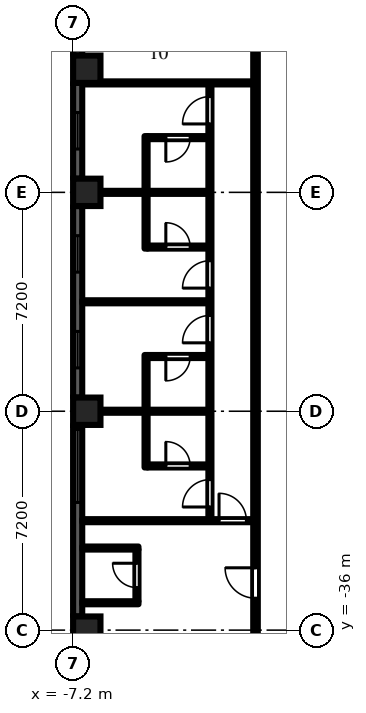
"""IFC4 building model, lengths in metres.
Left out: names, types, materials, properties, quantities, classifications, styles, units other than length and angle.
Written with IfcOpenShell. Run it as: python <this file> out.ifc"""

import sys

from ifc_helpers import new_model, si_unit, direction, frame, frame_2d, origin, origin_2d, place, context, subcontext, project, spatial, rectangle, extrude, element, fill, save


model = new_model("IFC4")
c1 = context("Model", 3, precision=1e-05, world=origin(), true_north=direction((0.0, 1.0)))
c2 = subcontext(c1, "Body", "Model", "MODEL_VIEW")
j1 = project(units=[si_unit("LENGTHUNIT", "METRE"), si_unit("PLANEANGLEUNIT", "RADIAN")], contexts=[c1])
p1 = place(None, origin())
s1 = spatial("IfcSite", under=j1, at=p1, CompositionType="ELEMENT")
p2 = place(p1, origin())
s2 = spatial("IfcBuilding", under=s1, at=p2, CompositionType="ELEMENT")
p3 = place(p2, frame((0.0, 0.0, 20.7)))
s3 = spatial("IfcBuildingStorey", under=s2, at=p3, CompositionType="ELEMENT", Elevation=20.7)
for number, where, z_axis, x_axis in (
    (1, (-6.75, -36.0, 0.0), (0.0, 0.0, 1.0), (1.0, 0.0, 0.0)),
    (2, (-6.75, -28.8, 0.0), (0.0, 0.0, 1.0), (1.0, 0.0, 0.0)),
    (3, (-6.75, -21.6, 0.0), (0.0, 0.0, 1.0), (1.0, 0.0, 0.0)),
    (4, (-6.75, -17.55, 0.0), (0.0, 0.0, 1.0), (1.0, 0.0, 0.0)),
):
    element("IfcColumn", number, at=place(p3, frame(where, z_axis=z_axis, x_axis=x_axis)), inside=s3, PredefinedType="COLUMN", context=c2, shape_type="SweptSolid", body=[
        extrude(rectangle(XDim=0.9, YDim=0.9, at=origin_2d()), origin(), (0.0, 0.0, 1.0), 3.0),
    ])
p4 = place(p3, frame((-7.05, -15.3, 0.0), z_axis=(0.0, 0.0, 1.0), x_axis=(0.0, -1.0, 0.0)))
e5 = element("IfcWall", 5, at=p4, inside=s3, PredefinedType="SOLIDWALL", context=c2, shape_type="SweptSolid", body=[
    extrude(rectangle(XDim=1.8, YDim=0.3, at=frame_2d((0.9, 0.0))), origin(), (0.0, 0.0, 1.0), 2.1),
])
p5 = place(p4, frame((0.3, 0.0, 0.2)))
e6 = element("IfcOpeningElement", 6, at=p5, cuts=e5, PredefinedType="OPENING", context=c2, shape_type="SweptSolid", body=[
    extrude(rectangle(XDim=1.2, YDim=1.85, at=frame_2d((0.6, 0.925))), frame((0.0, 0.16, 0.0), z_axis=(0.0, -1.0, 0.0), x_axis=(1.0, 0.0, 0.0)), (0.0, 0.0, 1.0), 0.32),
])
p6 = place(p3, frame((-7.05, -18.0, 0.0), z_axis=(0.0, 0.0, 1.0), x_axis=(0.0, -1.0, 0.0)))
e7 = element("IfcWall", 7, at=p6, inside=s3, PredefinedType="SOLIDWALL", context=c2, shape_type="SweptSolid", body=[
    extrude(rectangle(XDim=3.15, YDim=0.3, at=frame_2d((1.575, 0.0))), origin(), (0.0, 0.0, 1.0), 2.1),
])
p7 = place(p6, frame((0.975, 0.0, 0.2)))
e8 = element("IfcOpeningElement", 8, at=p7, cuts=e7, PredefinedType="OPENING", context=c2, shape_type="SweptSolid", body=[
    extrude(rectangle(XDim=1.2, YDim=1.85, at=frame_2d((0.6, 0.925))), frame((0.0, 0.16, 0.0), z_axis=(0.0, -1.0, 0.0), x_axis=(1.0, 0.0, 0.0)), (0.0, 0.0, 1.0), 0.32),
])
p8 = place(p3, frame((-7.05, -22.05, 0.0), z_axis=(0.0, 0.0, 1.0), x_axis=(0.0, -1.0, 0.0)))
e9 = element("IfcWall", 9, at=p8, inside=s3, PredefinedType="SOLIDWALL", context=c2, shape_type="SweptSolid", body=[
    extrude(rectangle(XDim=6.3, YDim=0.3, at=frame_2d((3.15, 0.0))), origin(), (0.0, 0.0, 1.0), 2.1),
])
p9 = place(p8, frame((0.975, 0.0, 0.2)))
e10 = element("IfcOpeningElement", 10, at=p9, cuts=e9, PredefinedType="OPENING", context=c2, shape_type="SweptSolid", body=[
    extrude(rectangle(XDim=1.2, YDim=1.85, at=frame_2d((0.6, 0.925))), frame((0.0, 0.16, 0.0), z_axis=(0.0, -1.0, 0.0), x_axis=(1.0, 0.0, 0.0)), (0.0, 0.0, 1.0), 0.32),
])
p10 = place(p8, frame((4.125, 0.0, 0.2)))
e11 = element("IfcOpeningElement", 11, at=p10, cuts=e9, PredefinedType="OPENING", context=c2, shape_type="SweptSolid", body=[
    extrude(rectangle(XDim=1.2, YDim=1.85, at=frame_2d((0.6, 0.925))), frame((0.0, 0.16, 0.0), z_axis=(0.0, -1.0, 0.0), x_axis=(1.0, 0.0, 0.0)), (0.0, 0.0, 1.0), 0.32),
])
p11 = place(p3, frame((-7.05, -29.25, 0.0), z_axis=(0.0, 0.0, 1.0), x_axis=(0.0, -1.0, 0.0)))
e12 = element("IfcWall", 12, at=p11, inside=s3, PredefinedType="SOLIDWALL", context=c2, shape_type="SweptSolid", body=[
    extrude(rectangle(XDim=6.3, YDim=0.3, at=frame_2d((3.15, 0.0))), origin(), (0.0, 0.0, 1.0), 2.1),
])
p12 = place(p11, frame((0.15, 0.0, 0.2)))
e13 = element("IfcOpeningElement", 13, at=p12, cuts=e12, PredefinedType="OPENING", context=c2, shape_type="SweptSolid", body=[
    extrude(rectangle(XDim=2.4, YDim=1.85, at=frame_2d((1.2, 0.925))), frame((0.0, 0.16, 0.0), z_axis=(0.0, -1.0, 0.0), x_axis=(1.0, 0.0, 0.0)), (0.0, 0.0, 1.0), 0.32),
])
for number, where, z_axis, x_axis in (
    (14, (-6.9, -35.1, 0.0), (0.0, 0.0, 1.0), (1.0, 0.0, 0.0)),
    (15, (-6.9, -33.3, 0.0), (0.0, 0.0, 1.0), (1.0, 0.0, 0.0)),
):
    element("IfcWall", number, at=place(p3, frame(where, z_axis=z_axis, x_axis=x_axis)), inside=s3, PredefinedType="PARTITIONING", context=c2, shape_type="SweptSolid", body=[
        extrude(rectangle(XDim=1.85, YDim=0.1, at=frame_2d((0.925, 0.0))), origin(), (0.0, 0.0, 1.0), 2.575),
    ])
p13 = place(p3, frame((-6.9, -32.4, 0.0), z_axis=(0.0, 0.0, 1.0), x_axis=(1.0, 0.0, 0.0)))
e16 = element("IfcWall", 16, at=p13, inside=s3, PredefinedType="PARTITIONING", context=c2, shape_type="SweptSolid", body=[
    extrude(rectangle(XDim=5.625, YDim=0.1, at=frame_2d((2.812, 0.0))), origin(), (0.0, 0.0, 1.0), 2.575),
])
p14 = place(p13, frame((4.5, 0.0, 0.0)))
e17 = element("IfcOpeningElement", 17, at=p14, cuts=e16, PredefinedType="OPENING", context=c2, shape_type="SweptSolid", body=[
    extrude(rectangle(XDim=0.9, YDim=2.1, at=frame_2d((0.45, 1.05))), frame((0.0, 0.06, 0.0), z_axis=(0.0, -1.0, 0.0), x_axis=(1.0, 0.0, 0.0)), (0.0, 0.0, 1.0), 0.12),
])
for number, where, z_axis, x_axis in (
    (18, (-6.9, -28.8, 0.0), (0.0, 0.0, 1.0), (1.0, 0.0, 0.0)),
    (19, (-6.9, -25.2, 0.0), (0.0, 0.0, 1.0), (1.0, 0.0, 0.0)),
    (20, (-6.9, -21.6, 0.0), (0.0, 0.0, 1.0), (1.0, 0.0, 0.0)),
):
    element("IfcWall", number, at=place(p3, frame(where, z_axis=z_axis, x_axis=x_axis)), inside=s3, PredefinedType="PARTITIONING", context=c2, shape_type="SweptSolid", body=[
        extrude(rectangle(XDim=4.15, YDim=0.1, at=frame_2d((2.075, 0.0))), origin(), (0.0, 0.0, 1.0), 2.575),
    ])
p15 = place(p3, frame((-6.9, -18.0, 0.0), z_axis=(0.0, 0.0, 1.0), x_axis=(1.0, 0.0, 0.0)))
e21 = element("IfcWall", 21, at=p15, inside=s3, PredefinedType="PARTITIONING", context=c2, shape_type="SweptSolid", body=[
    extrude(rectangle(XDim=5.625, YDim=0.1, at=frame_2d((2.812, 0.0))), origin(), (0.0, 0.0, 1.0), 2.575),
])
p16 = place(p3, frame((-5.1, -35.05, 0.0), z_axis=(0.0, 0.0, 1.0), x_axis=(0.0, 1.0, 0.0)))
e22 = element("IfcWall", 22, at=p16, inside=s3, PredefinedType="PARTITIONING", context=c2, shape_type="SweptSolid", body=[
    extrude(rectangle(XDim=1.7, YDim=0.1, at=frame_2d((0.85, 0.0))), origin(), (0.0, 0.0, 1.0), 2.575),
])
p17 = place(p16, frame((0.45, 0.0, 0.0)))
e23 = element("IfcOpeningElement", 23, at=p17, cuts=e22, PredefinedType="OPENING", context=c2, shape_type="SweptSolid", body=[
    extrude(rectangle(XDim=0.8, YDim=2.1, at=frame_2d((0.4, 1.05))), frame((0.0, 0.06, 0.0), z_axis=(0.0, -1.0, 0.0), x_axis=(1.0, 0.0, 0.0)), (0.0, 0.0, 1.0), 0.12),
])
p18 = place(p3, frame((-4.8, -30.65, 0.0), z_axis=(0.0, 0.0, 1.0), x_axis=(0.0, 1.0, 0.0)))
e24 = element("IfcWall", 24, at=p18, inside=s3, PredefinedType="PARTITIONING", context=c2, shape_type="SweptSolid", body=[
    extrude(rectangle(XDim=3.7, YDim=0.1, at=frame_2d((1.85, 0.0))), origin(), (0.0, 0.0, 1.0), 2.575),
])
p19 = place(p3, frame((-4.75, -30.6, 0.0), z_axis=(0.0, 0.0, 1.0), x_axis=(1.0, 0.0, 0.0)))
e25 = element("IfcWall", 25, at=p19, inside=s3, PredefinedType="PARTITIONING", context=c2, shape_type="SweptSolid", body=[
    extrude(rectangle(XDim=2.0, YDim=0.1, at=frame_2d((1.0, 0.0))), origin(), (0.0, 0.0, 1.0), 2.575),
])
p20 = place(p19, frame((0.6, 0.0, 0.0)))
e26 = element("IfcOpeningElement", 26, at=p20, cuts=e25, PredefinedType="OPENING", context=c2, shape_type="SweptSolid", body=[
    extrude(rectangle(XDim=0.8, YDim=2.1, at=frame_2d((0.4, 1.05))), frame((0.0, 0.06, 0.0), z_axis=(0.0, -1.0, 0.0), x_axis=(1.0, 0.0, 0.0)), (0.0, 0.0, 1.0), 0.12),
])
p21 = place(p3, frame((-4.75, -27.0, 0.0), z_axis=(0.0, 0.0, 1.0), x_axis=(1.0, 0.0, 0.0)))
e27 = element("IfcWall", 27, at=p21, inside=s3, PredefinedType="PARTITIONING", context=c2, shape_type="SweptSolid", body=[
    extrude(rectangle(XDim=2.0, YDim=0.1, at=frame_2d((1.0, 0.0))), origin(), (0.0, 0.0, 1.0), 2.575),
])
p22 = place(p21, frame((0.6, 0.0, 0.0)))
e28 = element("IfcOpeningElement", 28, at=p22, cuts=e27, PredefinedType="OPENING", context=c2, shape_type="SweptSolid", body=[
    extrude(rectangle(XDim=0.8, YDim=2.1, at=frame_2d((0.4, 1.05))), frame((0.0, 0.06, 0.0), z_axis=(0.0, -1.0, 0.0), x_axis=(1.0, 0.0, 0.0)), (0.0, 0.0, 1.0), 0.12),
])
p23 = place(p3, frame((-4.8, -23.45, 0.0), z_axis=(0.0, 0.0, 1.0), x_axis=(0.0, 1.0, 0.0)))
e29 = element("IfcWall", 29, at=p23, inside=s3, PredefinedType="PARTITIONING", context=c2, shape_type="SweptSolid", body=[
    extrude(rectangle(XDim=3.7, YDim=0.1, at=frame_2d((1.85, 0.0))), origin(), (0.0, 0.0, 1.0), 2.575),
])
p24 = place(p3, frame((-4.75, -23.4, 0.0), z_axis=(0.0, 0.0, 1.0), x_axis=(1.0, 0.0, 0.0)))
e30 = element("IfcWall", 30, at=p24, inside=s3, PredefinedType="PARTITIONING", context=c2, shape_type="SweptSolid", body=[
    extrude(rectangle(XDim=2.0, YDim=0.1, at=frame_2d((1.0, 0.0))), origin(), (0.0, 0.0, 1.0), 2.575),
])
p25 = place(p24, frame((0.6, 0.0, 0.0)))
e31 = element("IfcOpeningElement", 31, at=p25, cuts=e30, PredefinedType="OPENING", context=c2, shape_type="SweptSolid", body=[
    extrude(rectangle(XDim=0.8, YDim=2.1, at=frame_2d((0.4, 1.05))), frame((0.0, 0.06, 0.0), z_axis=(0.0, -1.0, 0.0), x_axis=(1.0, 0.0, 0.0)), (0.0, 0.0, 1.0), 0.12),
])
p26 = place(p3, frame((-4.75, -19.8, 0.0), z_axis=(0.0, 0.0, 1.0), x_axis=(1.0, 0.0, 0.0)))
e32 = element("IfcWall", 32, at=p26, inside=s3, PredefinedType="PARTITIONING", context=c2, shape_type="SweptSolid", body=[
    extrude(rectangle(XDim=2.0, YDim=0.1, at=frame_2d((1.0, 0.0))), origin(), (0.0, 0.0, 1.0), 2.575),
])
p27 = place(p26, frame((0.6, 0.0, 0.0)))
e33 = element("IfcOpeningElement", 33, at=p27, cuts=e32, PredefinedType="OPENING", context=c2, shape_type="SweptSolid", body=[
    extrude(rectangle(XDim=0.8, YDim=2.1, at=frame_2d((0.4, 1.05))), frame((0.0, 0.06, 0.0), z_axis=(0.0, -1.0, 0.0), x_axis=(1.0, 0.0, 0.0)), (0.0, 0.0, 1.0), 0.12),
])
p28 = place(p3, frame((-2.7, -32.35, 0.0), z_axis=(0.0, 0.0, 1.0), x_axis=(0.0, 1.0, 0.0)))
e34 = element("IfcWall", 34, at=p28, inside=s3, PredefinedType="PARTITIONING", context=c2, shape_type="SweptSolid", body=[
    extrude(rectangle(XDim=14.3, YDim=0.1, at=frame_2d((7.15, 0.0))), origin(), (0.0, 0.0, 1.0), 2.575),
])
p29 = place(p28, frame((0.4, 0.0, 0.0)))
e35 = element("IfcOpeningElement", 35, at=p29, cuts=e34, PredefinedType="OPENING", context=c2, shape_type="SweptSolid", body=[
    extrude(rectangle(XDim=0.9, YDim=2.1, at=frame_2d((0.45, 1.05))), frame((0.0, 0.06, 0.0), z_axis=(0.0, -1.0, 0.0), x_axis=(1.0, 0.0, 0.0)), (0.0, 0.0, 1.0), 0.12),
])
p30 = place(p28, frame((5.8, 0.0, 0.0)))
e36 = element("IfcOpeningElement", 36, at=p30, cuts=e34, PredefinedType="OPENING", context=c2, shape_type="SweptSolid", body=[
    extrude(rectangle(XDim=0.9, YDim=2.1, at=frame_2d((0.45, 1.05))), frame((0.0, 0.06, 0.0), z_axis=(0.0, -1.0, 0.0), x_axis=(1.0, 0.0, 0.0)), (0.0, 0.0, 1.0), 0.12),
])
p31 = place(p28, frame((7.6, 0.0, 0.0)))
e37 = element("IfcOpeningElement", 37, at=p31, cuts=e34, PredefinedType="OPENING", context=c2, shape_type="SweptSolid", body=[
    extrude(rectangle(XDim=0.9, YDim=2.1, at=frame_2d((0.45, 1.05))), frame((0.0, 0.06, 0.0), z_axis=(0.0, -1.0, 0.0), x_axis=(1.0, 0.0, 0.0)), (0.0, 0.0, 1.0), 0.12),
])
p32 = place(p28, frame((13.0, 0.0, 0.0)))
e38 = element("IfcOpeningElement", 38, at=p32, cuts=e34, PredefinedType="OPENING", context=c2, shape_type="SweptSolid", body=[
    extrude(rectangle(XDim=0.9, YDim=2.1, at=frame_2d((0.45, 1.05))), frame((0.0, 0.06, 0.0), z_axis=(0.0, -1.0, 0.0), x_axis=(1.0, 0.0, 0.0)), (0.0, 0.0, 1.0), 0.12),
])
p33 = place(p3, frame((-1.2, -36.5, 0.0), z_axis=(0.0, 0.0, 1.0), x_axis=(0.0, 1.0, 0.0)))
e39 = element("IfcWall", 39, at=p33, inside=s3, PredefinedType="PARTITIONING", context=c2, shape_type="SweptSolid", body=[
    extrude(rectangle(XDim=35.225, YDim=0.15, at=frame_2d((17.613, 0.0))), origin(), (0.0, 0.0, 1.0), 2.575),
])
p34 = place(p33, frame((30.35, 0.0, 0.0)))
e40 = element("IfcOpeningElement", 40, at=p34, cuts=e39, PredefinedType="OPENING", context=c2, shape_type="SweptSolid", body=[
    extrude(rectangle(XDim=0.9, YDim=2.1, at=frame_2d((0.45, 1.05))), frame((0.0, 0.085, 0.0), z_axis=(0.0, -1.0, 0.0), x_axis=(1.0, 0.0, 0.0)), (0.0, 0.0, 1.0), 0.17),
])
p35 = place(p33, frame((23.05, 0.0, 0.0)))
e41 = element("IfcOpeningElement", 41, at=p35, cuts=e39, PredefinedType="OPENING", context=c2, shape_type="SweptSolid", body=[
    extrude(rectangle(XDim=0.9, YDim=2.1, at=frame_2d((0.45, 1.05))), frame((0.0, 0.085, 0.0), z_axis=(0.0, -1.0, 0.0), x_axis=(1.0, 0.0, 0.0)), (0.0, 0.0, 1.0), 0.17),
])
p36 = place(p33, frame((26.65, 0.0, 0.0)))
e42 = element("IfcOpeningElement", 42, at=p36, cuts=e39, PredefinedType="OPENING", context=c2, shape_type="SweptSolid", body=[
    extrude(rectangle(XDim=0.9, YDim=2.1, at=frame_2d((0.45, 1.05))), frame((0.0, 0.085, 0.0), z_axis=(0.0, -1.0, 0.0), x_axis=(1.0, 0.0, 0.0)), (0.0, 0.0, 1.0), 0.17),
])
p37 = place(p33, frame((19.85, 0.0, 0.0)))
e43 = element("IfcOpeningElement", 43, at=p37, cuts=e39, PredefinedType="OPENING", context=c2, shape_type="SweptSolid", body=[
    extrude(rectangle(XDim=0.9, YDim=2.1, at=frame_2d((0.45, 1.05))), frame((0.0, 0.085, 0.0), z_axis=(0.0, -1.0, 0.0), x_axis=(1.0, 0.0, 0.0)), (0.0, 0.0, 1.0), 0.17),
])
p38 = place(p33, frame((1.55, 0.0, 0.0)))
e44 = element("IfcOpeningElement", 44, at=p38, cuts=e39, PredefinedType="OPENING", context=c2, shape_type="SweptSolid", body=[
    extrude(rectangle(XDim=1.0, YDim=2.1, at=frame_2d((0.5, 1.05))), frame((0.0, 0.085, 0.0), z_axis=(0.0, -1.0, 0.0), x_axis=(1.0, 0.0, 0.0)), (0.0, 0.0, 1.0), 0.17),
])
p39 = place(p7, origin())
e45 = element("IfcWindow", 45, at=p39, inside=s3, PartitioningType="SINGLE_PANEL", PredefinedType="WINDOW", context=c2, shape_type="SweptSolid", body=[
    extrude(rectangle(XDim=1.2, YDim=1.85, at=frame_2d((0.6, 0.925))), frame((0.0, 0.03, 0.0), z_axis=(0.0, -1.0, 0.0), x_axis=(1.0, 0.0, 0.0)), (0.0, 0.0, 1.0), 0.06),
])
fill(e8, e45)
p40 = place(p9, origin())
e46 = element("IfcWindow", 46, at=p40, inside=s3, PartitioningType="SINGLE_PANEL", PredefinedType="WINDOW", context=c2, shape_type="SweptSolid", body=[
    extrude(rectangle(XDim=1.2, YDim=1.85, at=frame_2d((0.6, 0.925))), frame((0.0, 0.03, 0.0), z_axis=(0.0, -1.0, 0.0), x_axis=(1.0, 0.0, 0.0)), (0.0, 0.0, 1.0), 0.06),
])
fill(e10, e46)
p41 = place(p10, origin())
e47 = element("IfcWindow", 47, at=p41, inside=s3, PartitioningType="SINGLE_PANEL", PredefinedType="WINDOW", context=c2, shape_type="SweptSolid", body=[
    extrude(rectangle(XDim=1.2, YDim=1.85, at=frame_2d((0.6, 0.925))), frame((0.0, 0.03, 0.0), z_axis=(0.0, -1.0, 0.0), x_axis=(1.0, 0.0, 0.0)), (0.0, 0.0, 1.0), 0.06),
])
fill(e11, e47)
p42 = place(p12, origin())
e48 = element("IfcWindow", 48, at=p42, inside=s3, PartitioningType="SINGLE_PANEL", PredefinedType="WINDOW", context=c2, shape_type="SweptSolid", body=[
    extrude(rectangle(XDim=2.4, YDim=1.85, at=frame_2d((1.2, 0.925))), frame((0.0, 0.03, 0.0), z_axis=(0.0, -1.0, 0.0), x_axis=(1.0, 0.0, 0.0)), (0.0, 0.0, 1.0), 0.06),
])
fill(e13, e48)
p43 = place(p17, origin())
e49 = element("IfcDoor", 49, at=p43, inside=s3, OperationType="SINGLE_SWING_RIGHT", PredefinedType="DOOR", context=c2, shape_type="SweptSolid", body=[
    extrude(rectangle(XDim=0.8, YDim=2.1, at=frame_2d((0.4, 1.05))), frame((0.0, 0.025, 0.0), z_axis=(0.0, -1.0, 0.0), x_axis=(1.0, 0.0, 0.0)), (0.0, 0.0, 1.0), 0.05),
])
fill(e23, e49)
p44 = place(p38, origin())
e50 = element("IfcDoor", 50, at=p44, inside=s3, OperationType="SINGLE_SWING_RIGHT", PredefinedType="DOOR", context=c2, shape_type="SweptSolid", body=[
    extrude(rectangle(XDim=1.0, YDim=2.1, at=frame_2d((0.5, 1.05))), frame((0.0, 0.025, 0.0), z_axis=(0.0, -1.0, 0.0), x_axis=(1.0, 0.0, 0.0)), (0.0, 0.0, 1.0), 0.05),
])
fill(e44, e50)
p45 = place(p29, origin())
e51 = element("IfcDoor", 51, at=p45, inside=s3, OperationType="SINGLE_SWING_LEFT", PredefinedType="DOOR", context=c2, shape_type="SweptSolid", body=[
    extrude(rectangle(XDim=0.9, YDim=2.1, at=frame_2d((0.45, 1.05))), frame((0.0, 0.025, 0.0), z_axis=(0.0, -1.0, 0.0), x_axis=(1.0, 0.0, 0.0)), (0.0, 0.0, 1.0), 0.05),
])
fill(e35, e51)
p46 = place(p30, origin())
e52 = element("IfcDoor", 52, at=p46, inside=s3, OperationType="SINGLE_SWING_LEFT", PredefinedType="DOOR", context=c2, shape_type="SweptSolid", body=[
    extrude(rectangle(XDim=0.9, YDim=2.1, at=frame_2d((0.45, 1.05))), frame((0.0, 0.025, 0.0), z_axis=(0.0, -1.0, 0.0), x_axis=(1.0, 0.0, 0.0)), (0.0, 0.0, 1.0), 0.05),
])
fill(e36, e52)
p47 = place(p31, origin())
e53 = element("IfcDoor", 53, at=p47, inside=s3, OperationType="SINGLE_SWING_LEFT", PredefinedType="DOOR", context=c2, shape_type="SweptSolid", body=[
    extrude(rectangle(XDim=0.9, YDim=2.1, at=frame_2d((0.45, 1.05))), frame((0.0, 0.025, 0.0), z_axis=(0.0, -1.0, 0.0), x_axis=(1.0, 0.0, 0.0)), (0.0, 0.0, 1.0), 0.05),
])
fill(e37, e53)
p48 = place(p32, origin())
e54 = element("IfcDoor", 54, at=p48, inside=s3, OperationType="SINGLE_SWING_LEFT", PredefinedType="DOOR", context=c2, shape_type="SweptSolid", body=[
    extrude(rectangle(XDim=0.9, YDim=2.1, at=frame_2d((0.45, 1.05))), frame((0.0, 0.025, 0.0), z_axis=(0.0, -1.0, 0.0), x_axis=(1.0, 0.0, 0.0)), (0.0, 0.0, 1.0), 0.05),
])
fill(e38, e54)
p49 = place(p14, origin())
e55 = element("IfcDoor", 55, at=p49, inside=s3, OperationType="SINGLE_SWING_LEFT", PredefinedType="DOOR", context=c2, shape_type="SweptSolid", body=[
    extrude(rectangle(XDim=0.9, YDim=2.1, at=frame_2d((0.45, 1.05))), frame((0.0, 0.025, 0.0), z_axis=(0.0, -1.0, 0.0), x_axis=(1.0, 0.0, 0.0)), (0.0, 0.0, 1.0), 0.05),
])
fill(e17, e55)
p50 = place(p27, frame((0.8, 0.0, 0.0), z_axis=(0.0, 0.0, 1.0), x_axis=(-1.0, 0.0, 0.0)))
e56 = element("IfcDoor", 56, at=p50, inside=s3, OperationType="SINGLE_SWING_RIGHT", PredefinedType="DOOR", context=c2, shape_type="SweptSolid", body=[
    extrude(rectangle(XDim=0.8, YDim=2.1, at=frame_2d((0.4, 1.05))), frame((0.0, 0.025, 0.0), z_axis=(0.0, -1.0, 0.0), x_axis=(1.0, 0.0, 0.0)), (0.0, 0.0, 1.0), 0.05),
])
fill(e33, e56)
p51 = place(p25, origin())
e57 = element("IfcDoor", 57, at=p51, inside=s3, OperationType="SINGLE_SWING_LEFT", PredefinedType="DOOR", context=c2, shape_type="SweptSolid", body=[
    extrude(rectangle(XDim=0.8, YDim=2.1, at=frame_2d((0.4, 1.05))), frame((0.0, 0.025, 0.0), z_axis=(0.0, -1.0, 0.0), x_axis=(1.0, 0.0, 0.0)), (0.0, 0.0, 1.0), 0.05),
])
fill(e31, e57)
p52 = place(p22, frame((0.8, 0.0, 0.0), z_axis=(0.0, 0.0, 1.0), x_axis=(-1.0, 0.0, 0.0)))
e58 = element("IfcDoor", 58, at=p52, inside=s3, OperationType="SINGLE_SWING_RIGHT", PredefinedType="DOOR", context=c2, shape_type="SweptSolid", body=[
    extrude(rectangle(XDim=0.8, YDim=2.1, at=frame_2d((0.4, 1.05))), frame((0.0, 0.025, 0.0), z_axis=(0.0, -1.0, 0.0), x_axis=(1.0, 0.0, 0.0)), (0.0, 0.0, 1.0), 0.05),
])
fill(e28, e58)
p53 = place(p20, origin())
e59 = element("IfcDoor", 59, at=p53, inside=s3, OperationType="SINGLE_SWING_LEFT", PredefinedType="DOOR", context=c2, shape_type="SweptSolid", body=[
    extrude(rectangle(XDim=0.8, YDim=2.1, at=frame_2d((0.4, 1.05))), frame((0.0, 0.025, 0.0), z_axis=(0.0, -1.0, 0.0), x_axis=(1.0, 0.0, 0.0)), (0.0, 0.0, 1.0), 0.05),
])
fill(e26, e59)
save(model, sys.argv[1])
